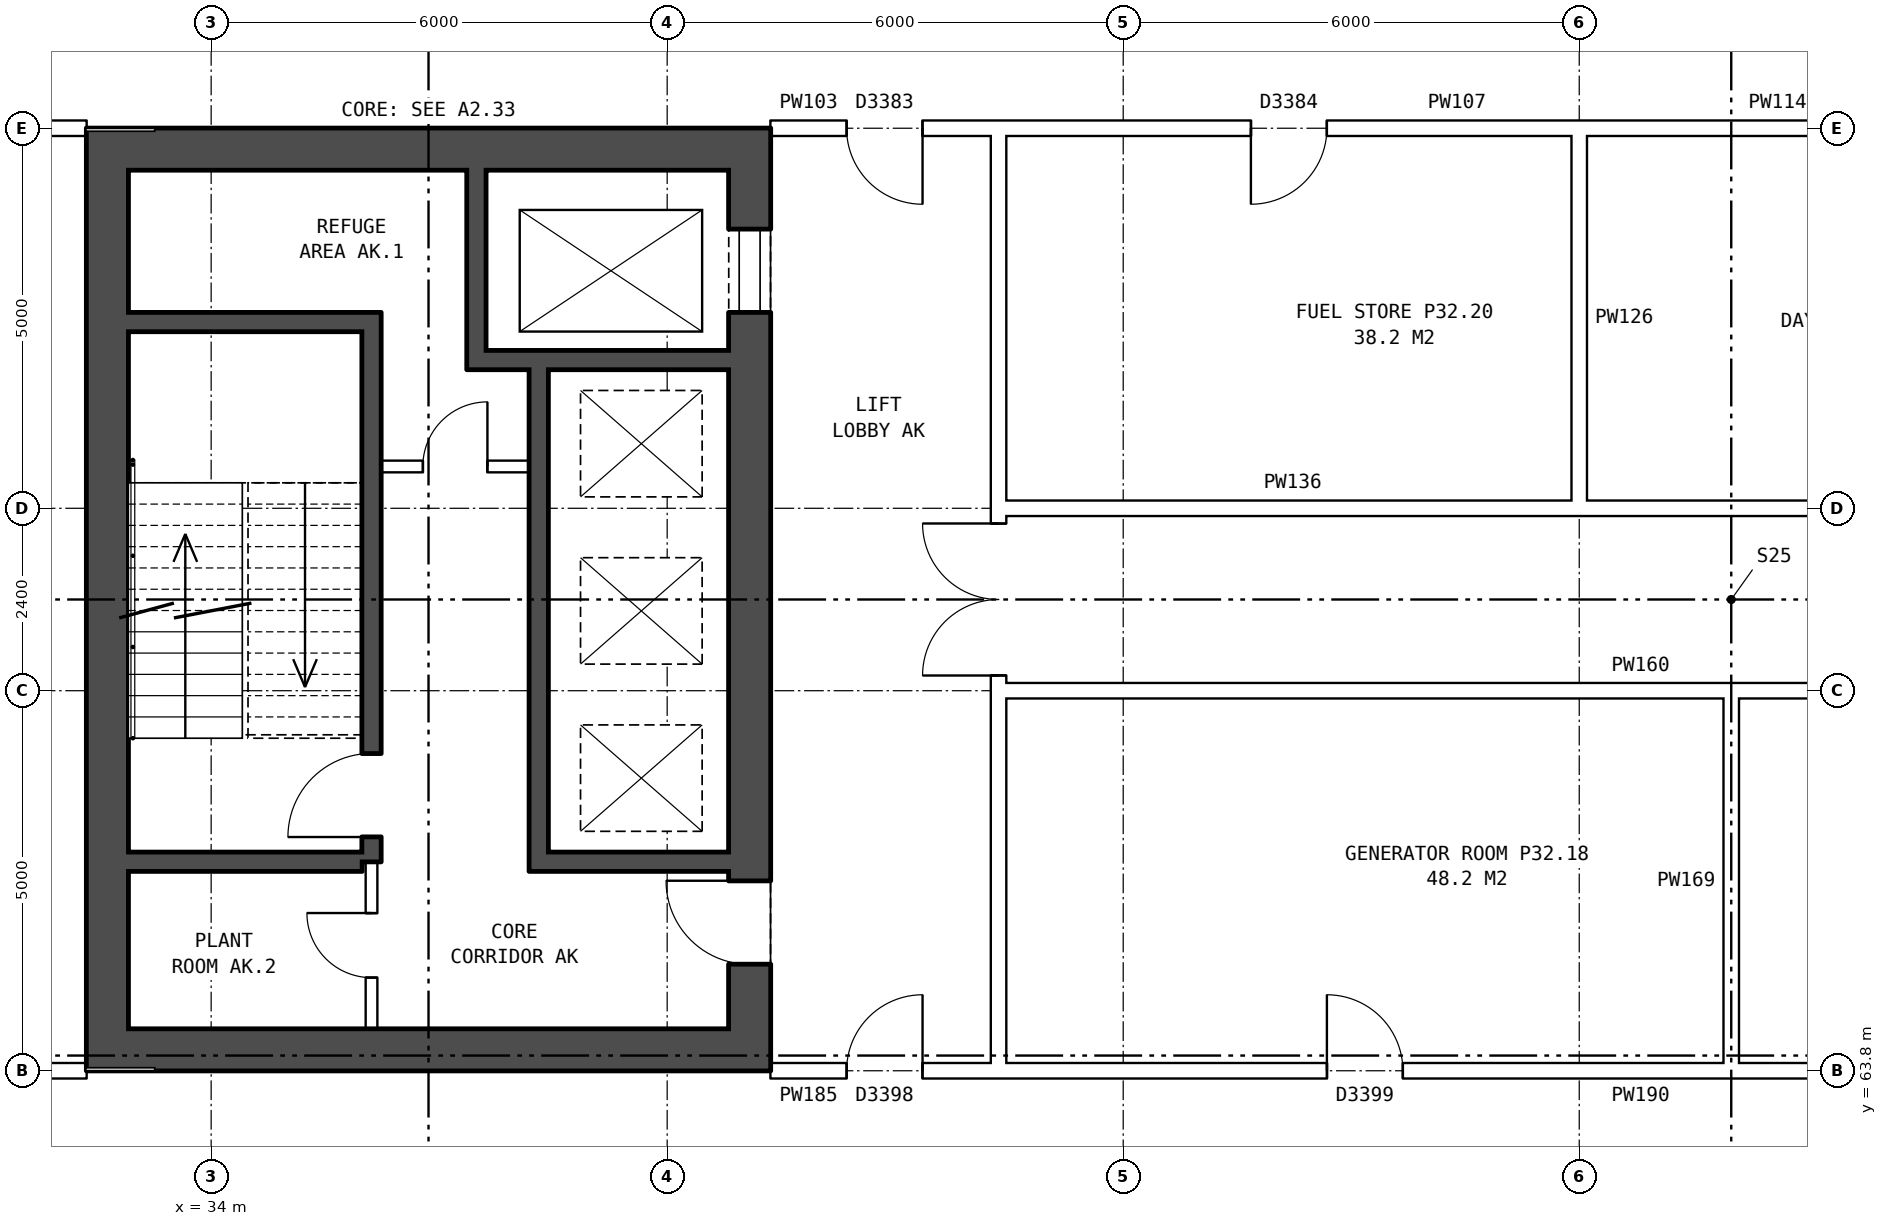
"""IFC4 building model, lengths in metres.
Left out: names, types, materials, properties, quantities, classifications, styles, units other than length and angle.
Written with IfcOpenShell. Run it as: python <this file> out.ifc"""

import sys

from ifc_helpers import new_model, si_unit, direction, frame, frame_2d, origin, place, context, subcontext, project, spatial, rectangle, extrude, element, fill, save


model = new_model("IFC4")
c1 = context("Model", 3, precision=1e-05, world=origin(), true_north=direction((0.0, 1.0)))
c2 = subcontext(c1, "Body", "Model", "MODEL_VIEW")
j1 = project(units=[si_unit("LENGTHUNIT", "METRE"), si_unit("PLANEANGLEUNIT", "RADIAN")], contexts=[c1])
p1 = place(None, origin())
s1 = spatial("IfcSite", under=j1, at=p1, CompositionType="ELEMENT")
p2 = place(p1, origin())
s2 = spatial("IfcBuilding", under=s1, at=p2, CompositionType="ELEMENT")
p3 = place(p2, frame((0.0, 0.0, 115.0)))
s3 = spatial("IfcBuildingStorey", under=s2, at=p3, CompositionType="ELEMENT", Elevation=115.0)
p4 = place(p3, frame((41.085, 76.2, 0.0), z_axis=(0.0, 0.0, 1.0), x_axis=(0.0, -1.0, 0.0)))
e1 = element("IfcWall", 1, at=p4, inside=s3, PredefinedType="SHEAR", context=c2, shape_type="SweptSolid", body=[
    extrude(rectangle(XDim=12.4, YDim=0.55, at=frame_2d((6.2, 0.0))), origin(), (0.0, 0.0, 1.0), 4.2),
])
p5 = place(p4, frame((1.325, 0.0, 0.0)))
e2 = element("IfcOpeningElement", 2, at=p5, cuts=e1, PredefinedType="OPENING", context=c2, shape_type="SweptSolid", body=[
    extrude(rectangle(XDim=1.1, YDim=2.1, at=frame_2d((0.55, 1.05))), frame((0.0, 0.285, 0.0), z_axis=(0.0, -1.0, 0.0), x_axis=(1.0, 0.0, 0.0)), (0.0, 0.0, 1.0), 0.57),
])
p6 = place(p4, frame((9.9, 0.0, 0.0)))
e3 = element("IfcOpeningElement", 3, at=p6, cuts=e1, PredefinedType="OPENING", context=c2, shape_type="SweptSolid", body=[
    extrude(rectangle(XDim=1.1, YDim=2.1, at=frame_2d((0.55, 1.05))), frame((0.0, 0.285, 0.0), z_axis=(0.0, -1.0, 0.0), x_axis=(1.0, 0.0, 0.0)), (0.0, 0.0, 1.0), 0.57),
])
p7 = place(p3, frame((32.635, 76.2, 0.0), z_axis=(0.0, 0.0, 1.0), x_axis=(0.0, -1.0, 0.0)))
e4 = element("IfcWall", 4, at=p7, inside=s3, PredefinedType="SHEAR", context=c2, shape_type="SweptSolid", body=[
    extrude(rectangle(XDim=12.4, YDim=0.55, at=frame_2d((6.2, 0.0))), origin(), (0.0, 0.0, 1.0), 4.2),
])
for number, where, z_axis, x_axis in (
    (5, (40.81, 75.925, 0.0), (0.0, 0.0, 1.0), (-1.0, 0.0, 0.0)),
    (6, (40.81, 64.075, 0.0), (0.0, 0.0, 1.0), (-1.0, 0.0, 0.0)),
):
    element("IfcWall", number, at=place(p3, frame(where, z_axis=z_axis, x_axis=x_axis)), inside=s3, PredefinedType="SHEAR", context=c2, shape_type="SweptSolid", body=[
        extrude(rectangle(XDim=7.9, YDim=0.55, at=frame_2d((3.95, 0.0))), origin(), (0.0, 0.0, 1.0), 4.2),
    ])
p8 = place(p3, frame((35.985, 73.65, 0.0), z_axis=(0.0, 0.0, 1.0), x_axis=(-1.0, 0.0, 0.0)))
e7 = element("IfcWall", 7, at=p8, inside=s3, PredefinedType="SHEAR", context=c2, shape_type="SweptSolid", body=[
    extrude(rectangle(XDim=3.075, YDim=0.25, at=frame_2d((1.538, 0.0))), origin(), (0.0, 0.0, 1.0), 4.2),
])
p9 = place(p3, frame((40.81, 73.15, 0.0), z_axis=(0.0, 0.0, 1.0), x_axis=(-1.0, 0.0, 0.0)))
e8 = element("IfcWall", 8, at=p9, inside=s3, PredefinedType="SHEAR", context=c2, shape_type="SweptSolid", body=[
    extrude(rectangle(XDim=3.445, YDim=0.25, at=frame_2d((1.723, 0.0))), origin(), (0.0, 0.0, 1.0), 4.2),
])
p10 = place(p3, frame((38.185, 71.75, 0.0), z_axis=(0.0, 0.0, 1.0), x_axis=(-1.0, 0.0, 0.0)))
e9 = element("IfcWall", 9, at=p10, inside=s3, PredefinedType="PARTITIONING", context=c2, shape_type="SweptSolid", body=[
    extrude(rectangle(XDim=1.95, YDim=0.15, at=frame_2d((0.975, 0.0))), origin(), (0.0, 0.0, 1.0), 4.2),
])
p11 = place(p10, frame((0.55, 0.0, 0.0)))
e10 = element("IfcOpeningElement", 10, at=p11, cuts=e9, PredefinedType="OPENING", context=c2, shape_type="SweptSolid", body=[
    extrude(rectangle(XDim=0.85, YDim=2.1, at=frame_2d((0.425, 1.05))), frame((0.0, 0.085, 0.0), z_axis=(0.0, -1.0, 0.0), x_axis=(1.0, 0.0, 0.0)), (0.0, 0.0, 1.0), 0.17),
])
p12 = place(p3, frame((40.81, 66.55, 0.0), z_axis=(0.0, 0.0, 1.0), x_axis=(-1.0, 0.0, 0.0)))
e11 = element("IfcWall", 11, at=p12, inside=s3, PredefinedType="SHEAR", context=c2, shape_type="SweptSolid", body=[
    extrude(rectangle(XDim=2.375, YDim=0.25, at=frame_2d((1.188, 0.0))), origin(), (0.0, 0.0, 1.0), 4.2),
])
p13 = place(p3, frame((35.985, 66.55, 0.0), z_axis=(0.0, 0.0, 1.0), x_axis=(-1.0, 0.0, 0.0)))
e12 = element("IfcWall", 12, at=p13, inside=s3, PredefinedType="SHEAR", context=c2, shape_type="SweptSolid", body=[
    extrude(rectangle(XDim=3.075, YDim=0.25, at=frame_2d((1.538, 0.0))), origin(), (0.0, 0.0, 1.0), 4.2),
])
p14 = place(p3, frame((38.31, 73.025, 0.0), z_axis=(0.0, 0.0, 1.0), x_axis=(0.0, -1.0, 0.0)))
e13 = element("IfcWall", 13, at=p14, inside=s3, PredefinedType="SHEAR", context=c2, shape_type="SweptSolid", body=[
    extrude(rectangle(XDim=6.6, YDim=0.25, at=frame_2d((3.3, 0.0))), origin(), (0.0, 0.0, 1.0), 4.2),
])
p15 = place(p3, frame((37.49, 75.65, 0.0), z_axis=(0.0, 0.0, 1.0), x_axis=(0.0, -1.0, 0.0)))
e14 = element("IfcWall", 14, at=p15, inside=s3, PredefinedType="SHEAR", context=c2, shape_type="SweptSolid", body=[
    extrude(rectangle(XDim=2.375, YDim=0.25, at=frame_2d((1.188, 0.0))), origin(), (0.0, 0.0, 1.0), 4.2),
])
p16 = place(p3, frame((36.11, 73.775, 0.0), z_axis=(0.0, 0.0, 1.0), x_axis=(0.0, -1.0, 0.0)))
e15 = element("IfcWall", 15, at=p16, inside=s3, PredefinedType="SHEAR", context=c2, shape_type="SweptSolid", body=[
    extrude(rectangle(XDim=7.225, YDim=0.25, at=frame_2d((3.612, 0.0))), origin(), (0.0, 0.0, 1.0), 4.2),
])
p17 = place(p16, frame((5.8, 0.0, 0.0)))
e16 = element("IfcOpeningElement", 16, at=p17, cuts=e15, PredefinedType="OPENING", context=c2, shape_type="SweptSolid", body=[
    extrude(rectangle(XDim=1.1, YDim=2.1, at=frame_2d((0.55, 1.05))), frame((0.0, 0.135, 0.0), z_axis=(0.0, -1.0, 0.0), x_axis=(1.0, 0.0, 0.0)), (0.0, 0.0, 1.0), 0.27),
])
p18 = place(p3, frame((36.11, 66.55, 0.0), z_axis=(0.0, 0.0, 1.0), x_axis=(0.0, -1.0, 0.0)))
e17 = element("IfcWall", 17, at=p18, inside=s3, PredefinedType="PARTITIONING", context=c2, shape_type="SweptSolid", body=[
    extrude(rectangle(XDim=2.2, YDim=0.15, at=frame_2d((1.1, 0.0))), origin(), (0.0, 0.0, 1.0), 4.2),
])
p19 = place(p18, frame((0.675, 0.0, 0.0)))
e18 = element("IfcOpeningElement", 18, at=p19, cuts=e17, PredefinedType="OPENING", context=c2, shape_type="SweptSolid", body=[
    extrude(rectangle(XDim=0.85, YDim=2.1, at=frame_2d((0.425, 1.05))), frame((0.0, 0.085, 0.0), z_axis=(0.0, -1.0, 0.0), x_axis=(1.0, 0.0, 0.0)), (0.0, 0.0, 1.0), 0.17),
])
p20 = place(p3, frame((44.36, 63.9, 0.0), z_axis=(0.0, 0.0, 1.0), x_axis=(0.0, 1.0, 0.0)))
e19 = element("IfcWall", 19, at=p20, inside=s3, PredefinedType="PARTITIONING", context=c2, shape_type="SweptSolid", body=[
    extrude(rectangle(XDim=12.2, YDim=0.2, at=frame_2d((6.1, 0.0))), origin(), (0.0, 0.0, 1.0), 4.2),
])
p21 = place(p20, frame((5.1, 0.0, 0.0)))
e20 = element("IfcOpeningElement", 20, at=p21, cuts=e19, PredefinedType="OPENING", context=c2, shape_type="SweptSolid", body=[
    extrude(rectangle(XDim=2.0, YDim=2.1, at=frame_2d((1.0, 1.05))), frame((0.0, 0.11, 0.0), z_axis=(0.0, -1.0, 0.0), x_axis=(1.0, 0.0, 0.0)), (0.0, 0.0, 1.0), 0.22),
])
p22 = place(p3, frame((26.99, 63.8, 0.0), z_axis=(0.0, 0.0, 1.0), x_axis=(1.0, 0.0, 0.0)))
e21 = element("IfcWall", 21, at=p22, inside=s3, PredefinedType="PARTITIONING", context=c2, shape_type="SweptSolid", body=[
    extrude(rectangle(XDim=5.37, YDim=0.2, at=frame_2d((2.685, 0.0))), origin(), (0.0, 0.0, 1.0), 4.2),
])
p23 = place(p22, frame((2.245, 0.0, 0.0)))
e22 = element("IfcOpeningElement", 22, at=p23, cuts=e21, PredefinedType="OPENING", context=c2, shape_type="SweptSolid", body=[
    extrude(rectangle(XDim=1.0, YDim=2.1, at=frame_2d((0.5, 1.05))), frame((0.0, 0.11, 0.0), z_axis=(0.0, -1.0, 0.0), x_axis=(1.0, 0.0, 0.0)), (0.0, 0.0, 1.0), 0.22),
])
p24 = place(p3, frame((44.36, 63.8, 0.0), z_axis=(0.0, 0.0, 1.0), x_axis=(1.0, 0.0, 0.0)))
e23 = element("IfcWall", 23, at=p24, inside=s3, PredefinedType="PARTITIONING", context=c2, shape_type="SweptSolid", body=[
    extrude(rectangle(XDim=19.28, YDim=0.2, at=frame_2d((9.64, 0.0))), origin(), (0.0, 0.0, 1.0), 4.2),
])
p25 = place(p24, frame((4.32, 0.0, 0.0)))
e24 = element("IfcOpeningElement", 24, at=p25, cuts=e23, PredefinedType="OPENING", context=c2, shape_type="SweptSolid", body=[
    extrude(rectangle(XDim=1.0, YDim=2.1, at=frame_2d((0.5, 1.05))), frame((0.0, 0.11, 0.0), z_axis=(0.0, -1.0, 0.0), x_axis=(1.0, 0.0, 0.0)), (0.0, 0.0, 1.0), 0.22),
])
p26 = place(p24, frame((13.96, 0.0, 0.0)))
e25 = element("IfcOpeningElement", 25, at=p26, cuts=e23, PredefinedType="OPENING", context=c2, shape_type="SweptSolid", body=[
    extrude(rectangle(XDim=1.0, YDim=2.1, at=frame_2d((0.5, 1.05))), frame((0.0, 0.11, 0.0), z_axis=(0.0, -1.0, 0.0), x_axis=(1.0, 0.0, 0.0)), (0.0, 0.0, 1.0), 0.22),
])
p27 = place(p3, frame((41.36, 63.8, 0.0), z_axis=(0.0, 0.0, 1.0), x_axis=(1.0, 0.0, 0.0)))
e26 = element("IfcWall", 26, at=p27, inside=s3, PredefinedType="PARTITIONING", context=c2, shape_type="SweptSolid", body=[
    extrude(rectangle(XDim=3.0, YDim=0.2, at=frame_2d((1.5, 0.0))), origin(), (0.0, 0.0, 1.0), 4.2),
])
p28 = place(p27, frame((1.0, 0.0, 0.0)))
e27 = element("IfcOpeningElement", 27, at=p28, cuts=e26, PredefinedType="OPENING", context=c2, shape_type="SweptSolid", body=[
    extrude(rectangle(XDim=1.0, YDim=2.1, at=frame_2d((0.5, 1.05))), frame((0.0, 0.11, 0.0), z_axis=(0.0, -1.0, 0.0), x_axis=(1.0, 0.0, 0.0)), (0.0, 0.0, 1.0), 0.22),
])
p29 = place(p3, frame((44.36, 68.8, 0.0), z_axis=(0.0, 0.0, 1.0), x_axis=(1.0, 0.0, 0.0)))
e28 = element("IfcWall", 28, at=p29, inside=s3, PredefinedType="PARTITIONING", context=c2, shape_type="SweptSolid", body=[
    extrude(rectangle(XDim=19.28, YDim=0.2, at=frame_2d((9.64, 0.0))), origin(), (0.0, 0.0, 1.0), 4.2),
])
p30 = place(p3, frame((51.9, 71.2, 0.0), z_axis=(0.0, 0.0, 1.0), x_axis=(1.0, 0.0, 0.0)))
e29 = element("IfcWall", 29, at=p30, inside=s3, PredefinedType="PARTITIONING", context=c2, shape_type="SweptSolid", body=[
    extrude(rectangle(XDim=11.74, YDim=0.2, at=frame_2d((5.87, 0.0))), origin(), (0.0, 0.0, 1.0), 4.2),
])
p31 = place(p3, frame((44.36, 71.2, 0.0), z_axis=(0.0, 0.0, 1.0), x_axis=(1.0, 0.0, 0.0)))
e30 = element("IfcWall", 30, at=p31, inside=s3, PredefinedType="PARTITIONING", context=c2, shape_type="SweptSolid", body=[
    extrude(rectangle(XDim=7.74, YDim=0.2, at=frame_2d((3.87, 0.0))), origin(), (0.0, 0.0, 1.0), 4.2),
])
p32 = place(p3, frame((26.99, 76.2, 0.0), z_axis=(0.0, 0.0, 1.0), x_axis=(1.0, 0.0, 0.0)))
e31 = element("IfcWall", 31, at=p32, inside=s3, PredefinedType="PARTITIONING", context=c2, shape_type="SweptSolid", body=[
    extrude(rectangle(XDim=5.37, YDim=0.2, at=frame_2d((2.685, 0.0))), origin(), (0.0, 0.0, 1.0), 4.2),
])
p33 = place(p3, frame((51.9, 76.2, 0.0), z_axis=(0.0, 0.0, 1.0), x_axis=(1.0, 0.0, 0.0)))
e32 = element("IfcWall", 32, at=p33, inside=s3, PredefinedType="PARTITIONING", context=c2, shape_type="SweptSolid", body=[
    extrude(rectangle(XDim=11.74, YDim=0.2, at=frame_2d((5.87, 0.0))), origin(), (0.0, 0.0, 1.0), 4.2),
])
p34 = place(p33, frame((5.42, 0.0, 0.0)))
e33 = element("IfcOpeningElement", 33, at=p34, cuts=e32, PredefinedType="OPENING", context=c2, shape_type="SweptSolid", body=[
    extrude(rectangle(XDim=1.0, YDim=2.1, at=frame_2d((0.5, 1.05))), frame((0.0, 0.11, 0.0), z_axis=(0.0, -1.0, 0.0), x_axis=(1.0, 0.0, 0.0)), (0.0, 0.0, 1.0), 0.22),
])
p35 = place(p3, frame((44.36, 76.2, 0.0), z_axis=(0.0, 0.0, 1.0), x_axis=(1.0, 0.0, 0.0)))
e34 = element("IfcWall", 34, at=p35, inside=s3, PredefinedType="PARTITIONING", context=c2, shape_type="SweptSolid", body=[
    extrude(rectangle(XDim=7.74, YDim=0.2, at=frame_2d((3.87, 0.0))), origin(), (0.0, 0.0, 1.0), 4.2),
])
p36 = place(p35, frame((3.32, 0.0, 0.0)))
e35 = element("IfcOpeningElement", 35, at=p36, cuts=e34, PredefinedType="OPENING", context=c2, shape_type="SweptSolid", body=[
    extrude(rectangle(XDim=1.0, YDim=2.1, at=frame_2d((0.5, 1.05))), frame((0.0, 0.11, 0.0), z_axis=(0.0, -1.0, 0.0), x_axis=(1.0, 0.0, 0.0)), (0.0, 0.0, 1.0), 0.22),
])
p37 = place(p3, frame((41.36, 76.2, 0.0), z_axis=(0.0, 0.0, 1.0), x_axis=(1.0, 0.0, 0.0)))
e36 = element("IfcWall", 36, at=p37, inside=s3, PredefinedType="PARTITIONING", context=c2, shape_type="SweptSolid", body=[
    extrude(rectangle(XDim=3.0, YDim=0.2, at=frame_2d((1.5, 0.0))), origin(), (0.0, 0.0, 1.0), 4.2),
])
p38 = place(p37, frame((1.0, 0.0, 0.0)))
e37 = element("IfcOpeningElement", 37, at=p38, cuts=e36, PredefinedType="OPENING", context=c2, shape_type="SweptSolid", body=[
    extrude(rectangle(XDim=1.0, YDim=2.1, at=frame_2d((0.5, 1.05))), frame((0.0, 0.11, 0.0), z_axis=(0.0, -1.0, 0.0), x_axis=(1.0, 0.0, 0.0)), (0.0, 0.0, 1.0), 0.22),
])
for number, where, z_axis, x_axis in (
    (38, (52.0, 71.1, 0.0), (0.0, 0.0, 1.0), (0.0, 1.0, 0.0)),
    (39, (54.0, 63.7, 0.0), (0.0, 0.0, 1.0), (0.0, 1.0, 0.0)),
):
    element("IfcWall", number, at=place(p3, frame(where, z_axis=z_axis, x_axis=x_axis)), inside=s3, PredefinedType="PARTITIONING", context=c2, shape_type="SweptSolid", body=[
        extrude(rectangle(XDim=5.2, YDim=0.2, at=frame_2d((2.6, 0.0))), origin(), (0.0, 0.0, 1.0), 4.2),
    ])
p39 = place(p5, origin())
e40 = element("IfcDoor", 40, at=p39, inside=s3, OperationType="DOUBLE_DOOR_SLIDING", PredefinedType="DOOR", context=c2, shape_type="SweptSolid", body=[
    extrude(rectangle(XDim=1.1, YDim=2.1, at=frame_2d((0.55, 1.05))), frame((0.0, -0.21, 0.0), z_axis=(0.0, -1.0, 0.0), x_axis=(1.0, 0.0, 0.0)), (0.0, 0.0, 1.0), 0.05),
])
fill(e2, e40)
p40 = place(p6, frame((1.1, 0.0, 0.0), z_axis=(0.0, 0.0, 1.0), x_axis=(-1.0, 0.0, 0.0)))
e41 = element("IfcDoor", 41, at=p40, inside=s3, OperationType="SINGLE_SWING_RIGHT", PredefinedType="DOOR", context=c2, shape_type="SweptSolid", body=[
    extrude(rectangle(XDim=1.1, YDim=2.1, at=frame_2d((0.55, 1.05))), frame((0.0, 0.26, 0.0), z_axis=(0.0, -1.0, 0.0), x_axis=(1.0, 0.0, 0.0)), (0.0, 0.0, 1.0), 0.05),
])
fill(e3, e41)
p41 = place(p17, frame((1.1, 0.0, 0.0), z_axis=(0.0, 0.0, 1.0), x_axis=(-1.0, 0.0, 0.0)))
e42 = element("IfcDoor", 42, at=p41, inside=s3, OperationType="SINGLE_SWING_LEFT", PredefinedType="DOOR", context=c2, shape_type="SweptSolid", body=[
    extrude(rectangle(XDim=1.1, YDim=2.1, at=frame_2d((0.55, 1.05))), frame((0.0, 0.025, 0.0), z_axis=(0.0, -1.0, 0.0), x_axis=(1.0, 0.0, 0.0)), (0.0, 0.0, 1.0), 0.05),
])
fill(e16, e42)
p42 = place(p11, frame((0.85, 0.0, 0.0), z_axis=(0.0, 0.0, 1.0), x_axis=(-1.0, 0.0, 0.0)))
e43 = element("IfcDoor", 43, at=p42, inside=s3, OperationType="SINGLE_SWING_RIGHT", PredefinedType="DOOR", context=c2, shape_type="SweptSolid", body=[
    extrude(rectangle(XDim=0.85, YDim=2.1, at=frame_2d((0.425, 1.05))), frame((0.0, 0.025, 0.0), z_axis=(0.0, -1.0, 0.0), x_axis=(1.0, 0.0, 0.0)), (0.0, 0.0, 1.0), 0.05),
])
fill(e10, e43)
p43 = place(p19, frame((0.85, 0.0, 0.0), z_axis=(0.0, 0.0, 1.0), x_axis=(-1.0, 0.0, 0.0)))
e44 = element("IfcDoor", 44, at=p43, inside=s3, OperationType="SINGLE_SWING_RIGHT", PredefinedType="DOOR", context=c2, shape_type="SweptSolid", body=[
    extrude(rectangle(XDim=0.85, YDim=2.1, at=frame_2d((0.425, 1.05))), frame((0.0, 0.025, 0.0), z_axis=(0.0, -1.0, 0.0), x_axis=(1.0, 0.0, 0.0)), (0.0, 0.0, 1.0), 0.05),
])
fill(e18, e44)
p44 = place(p21, origin())
e45 = element("IfcDoor", 45, at=p44, inside=s3, OperationType="DOUBLE_DOOR_SINGLE_SWING", PredefinedType="DOOR", context=c2, shape_type="SweptSolid", body=[
    extrude(rectangle(XDim=2.0, YDim=2.1, at=frame_2d((1.0, 1.05))), frame((0.0, 0.025, 0.0), z_axis=(0.0, -1.0, 0.0), x_axis=(1.0, 0.0, 0.0)), (0.0, 0.0, 1.0), 0.05),
])
fill(e20, e45)
p45 = place(p25, origin())
e46 = element("IfcDoor", 46, at=p45, inside=s3, OperationType="SINGLE_SWING_LEFT", PredefinedType="DOOR", context=c2, shape_type="SweptSolid", body=[
    extrude(rectangle(XDim=1.0, YDim=2.1, at=frame_2d((0.5, 1.05))), frame((0.0, 0.025, 0.0), z_axis=(0.0, -1.0, 0.0), x_axis=(1.0, 0.0, 0.0)), (0.0, 0.0, 1.0), 0.05),
])
fill(e24, e46)
p46 = place(p28, origin())
e47 = element("IfcDoor", 47, at=p46, inside=s3, OperationType="SINGLE_SWING_RIGHT", PredefinedType="DOOR", context=c2, shape_type="SweptSolid", body=[
    extrude(rectangle(XDim=1.0, YDim=2.1, at=frame_2d((0.5, 1.05))), frame((0.0, 0.025, 0.0), z_axis=(0.0, -1.0, 0.0), x_axis=(1.0, 0.0, 0.0)), (0.0, 0.0, 1.0), 0.05),
])
fill(e27, e47)
p47 = place(p36, frame((1.0, 0.0, 0.0), z_axis=(0.0, 0.0, 1.0), x_axis=(-1.0, 0.0, 0.0)))
e48 = element("IfcDoor", 48, at=p47, inside=s3, OperationType="SINGLE_SWING_RIGHT", PredefinedType="DOOR", context=c2, shape_type="SweptSolid", body=[
    extrude(rectangle(XDim=1.0, YDim=2.1, at=frame_2d((0.5, 1.05))), frame((0.0, 0.025, 0.0), z_axis=(0.0, -1.0, 0.0), x_axis=(1.0, 0.0, 0.0)), (0.0, 0.0, 1.0), 0.05),
])
fill(e35, e48)
p48 = place(p38, frame((1.0, 0.0, 0.0), z_axis=(0.0, 0.0, 1.0), x_axis=(-1.0, 0.0, 0.0)))
e49 = element("IfcDoor", 49, at=p48, inside=s3, OperationType="SINGLE_SWING_LEFT", PredefinedType="DOOR", context=c2, shape_type="SweptSolid", body=[
    extrude(rectangle(XDim=1.0, YDim=2.1, at=frame_2d((0.5, 1.05))), frame((0.0, 0.025, 0.0), z_axis=(0.0, -1.0, 0.0), x_axis=(1.0, 0.0, 0.0)), (0.0, 0.0, 1.0), 0.05),
])
fill(e37, e49)
save(model, sys.argv[1])
